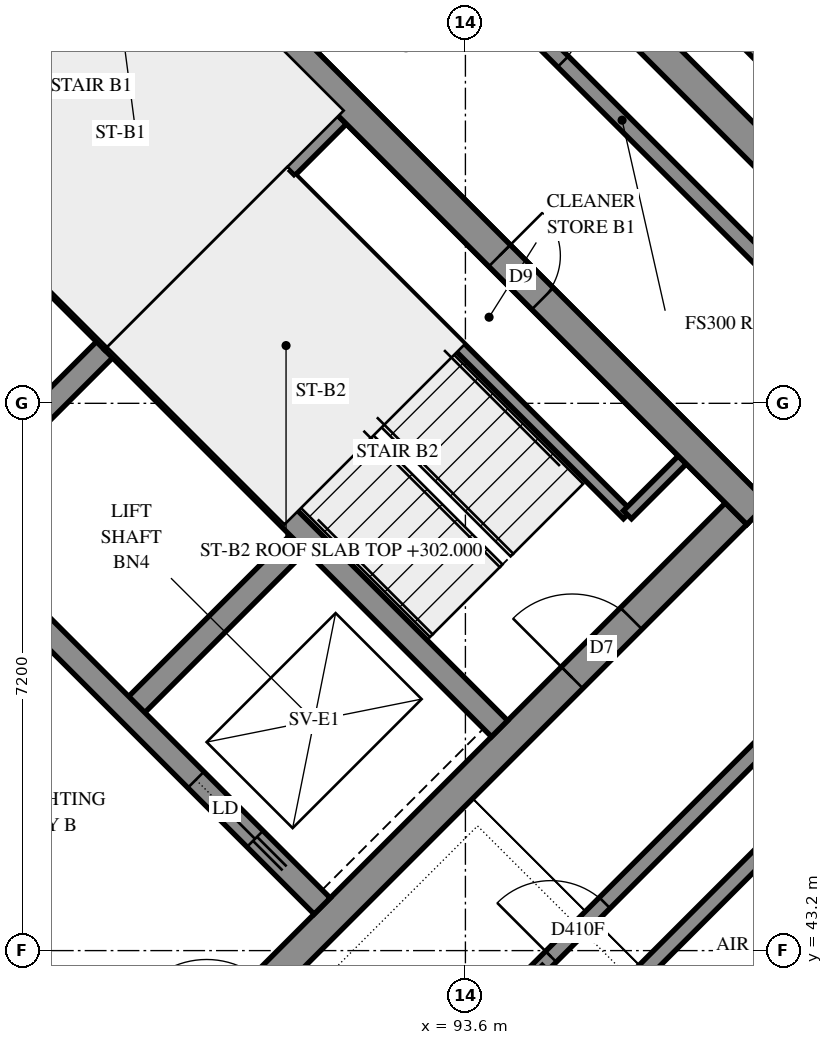
"""IFC4 building model, lengths in metres.
Left out: names, types, materials, properties, quantities, classifications, styles, units other than length and angle.
Written with IfcOpenShell. Run it as: python <this file> out.ifc"""

import sys

from ifc_helpers import new_model, si_unit, direction, frame, frame_2d, origin, place, context, subcontext, project, spatial, polyline, rectangle, outline, extrude, element, fill, save


model = new_model("IFC4")
c1 = context("Model", 3, precision=1e-05, world=origin(), true_north=direction((0.0, 1.0)))
c2 = subcontext(c1, "Body", "Model", "MODEL_VIEW")
j1 = project(units=[si_unit("LENGTHUNIT", "METRE"), si_unit("PLANEANGLEUNIT", "RADIAN")], contexts=[c1])
p1 = place(None, origin())
s1 = spatial("IfcSite", under=j1, at=p1, CompositionType="ELEMENT")
p2 = place(p1, origin())
s2 = spatial("IfcBuilding", under=s1, at=p2, CompositionType="ELEMENT")
p3 = place(p2, frame((0.0, 0.0, 302.0)))
s3 = spatial("IfcBuildingStorey", under=s2, at=p3, CompositionType="ELEMENT", Elevation=302.0)
p4 = place(p3, frame((86.695, 59.696, -0.3), z_axis=(0.0, 0.0, 1.0), x_axis=(0.7071100706, -0.7071034917, 0.0)))
e1 = element("IfcWall", 1, at=p4, inside=s3, PredefinedType="SHEAR", context=c2, shape_type="SweptSolid", body=[
    extrude(outline(polyline([(0.0, 0.0), (15.2, 0.0), (15.2, 3.1), (0.0, 3.1), (0.0, 0.0)])), frame((0.0, 0.2, 0.0), z_axis=(0.0, -1.0, 0.0), x_axis=(1.0, 0.0, 0.0)), (0.0, 0.0, 1.0), 0.4),
])
p5 = place(p4, frame((10.4, 0.0, 0.3)))
e2 = element("IfcOpeningElement", 2, at=p5, cuts=e1, PredefinedType="OPENING", context=c2, shape_type="SweptSolid", body=[
    extrude(rectangle(XDim=0.8, YDim=2.1, at=frame_2d((0.4, 1.05))), frame((0.0, 0.21, 0.0), z_axis=(0.0, -1.0, 0.0), x_axis=(1.0, 0.0, 0.0)), (0.0, 0.0, 1.0), 0.42),
])
p6 = place(p3, frame((89.17, 40.958, -0.3), z_axis=(0.0, 0.0, 1.0), x_axis=(0.7071067812, 0.7071067812, 0.0)))
e3 = element("IfcWall", 3, at=p6, inside=s3, PredefinedType="SHEAR", context=c2, shape_type="SweptSolid", body=[
    extrude(outline(polyline([(0.0, 0.0), (11.3, 0.0), (11.3, 3.1), (0.0, 3.1), (0.0, 0.0)])), frame((0.0, 0.2, 0.0), z_axis=(0.0, -1.0, 0.0), x_axis=(1.0, 0.0, 0.0)), (0.0, 0.0, 1.0), 0.4),
])
p7 = place(p6, frame((1.45, 0.0, 0.3)))
e4 = element("IfcOpeningElement", 4, at=p7, cuts=e3, PredefinedType="OPENING", context=c2, shape_type="SweptSolid", body=[
    extrude(rectangle(XDim=1.1, YDim=2.1, at=frame_2d((0.55, 1.05))), frame((0.0, 0.21, 0.0), z_axis=(0.0, -1.0, 0.0), x_axis=(1.0, 0.0, 0.0)), (0.0, 0.0, 1.0), 0.42),
])
p8 = place(p6, frame((8.25, 0.0, 0.3)))
e5 = element("IfcOpeningElement", 5, at=p8, cuts=e3, PredefinedType="OPENING", context=c2, shape_type="SweptSolid", body=[
    extrude(rectangle(XDim=1.1, YDim=2.1, at=frame_2d((0.55, 1.05))), frame((0.0, 0.21, 0.0), z_axis=(0.0, -1.0, 0.0), x_axis=(1.0, 0.0, 0.0)), (0.0, 0.0, 1.0), 0.42),
])
for number, where, z_axis, x_axis in (
    (6, (86.625, 48.878, 0.0), (0.0, 0.0, 1.0), (0.707, 0.707, 0.0)),
    (7, (89.17, 46.332, 0.0), (0.0, 0.0, 1.0), (0.707, 0.707, 0.0)),
):
    element("IfcWall", number, at=place(p3, frame(where, z_axis=z_axis, x_axis=x_axis)), inside=s3, PredefinedType="SOLIDWALL", context=c2, shape_type="SweptSolid", body=[
        extrude(outline(polyline([(0.0, 0.0), (3.3, 0.0), (3.3, 3.5), (0.0, 3.5), (0.0, 0.0)])), frame((0.0, 0.15, 0.0), z_axis=(0.0, -1.0, 0.0), x_axis=(1.0, 0.0, 0.0)), (0.0, 0.0, 1.0), 0.3),
    ])
p9 = place(p3, frame((78.988, 51.423, 0.0), z_axis=(0.0, 0.0, 1.0), x_axis=(0.7071067812, -0.7071067812, 0.0)))
e8 = element("IfcWall", 8, at=p9, inside=s3, PredefinedType="SOLIDWALL", context=c2, shape_type="SweptSolid", body=[
    extrude(outline(polyline([(0.0, 0.0), (14.4, 0.0), (14.4, 3.5), (0.0, 3.5), (0.0, 0.0)])), frame((0.0, 0.15, 0.0), z_axis=(0.0, -1.0, 0.0), x_axis=(1.0, 0.0, 0.0)), (0.0, 0.0, 1.0), 0.3),
])
p10 = place(p3, frame((81.534, 53.969, 0.0), z_axis=(0.0, 0.0, 1.0), x_axis=(0.707103309, -0.7071102534, 0.0)))
e9 = element("IfcWall", 9, at=p10, inside=s3, PredefinedType="SOLIDWALL", context=c2, shape_type="SweptSolid", body=[
    extrude(outline(polyline([(0.0, 0.0), (14.4, 0.0), (14.4, 3.5), (0.0, 3.5), (0.0, 0.0)])), frame((0.0, 0.15, 0.0), z_axis=(0.0, -1.0, 0.0), x_axis=(1.0, 0.0, 0.0)), (0.0, 0.0, 1.0), 0.3),
])
p11 = place(p10, frame((12.05, 0.0, 0.0)))
e10 = element("IfcOpeningElement", 10, at=p11, cuts=e9, PredefinedType="OPENING", context=c2, shape_type="SweptSolid", body=[
    extrude(rectangle(XDim=1.1, YDim=2.1, at=frame_2d((0.55, 1.05))), frame((0.0, 0.16, 0.0), z_axis=(0.0, -1.0, 0.0), x_axis=(1.0, 0.0, 0.0)), (0.0, 0.0, 1.0), 0.32),
])
for number, where, z_axis, x_axis in (
    (11, (83.867, 56.302, 0.0), (0.0, 0.0, 1.0), (0.707, -0.707, 0.0)),
    (12, (88.958, 51.211, 0.0), (0.0, 0.0, 1.0), (0.707, -0.707, 0.0)),
):
    element("IfcWall", number, at=place(p3, frame(where, z_axis=z_axis, x_axis=x_axis)), inside=s3, PredefinedType="SOLIDWALL", context=c2, shape_type="SweptSolid", body=[
        extrude(outline(polyline([(0.0, 0.0), (7.2, 0.0), (7.2, 3.5), (0.0, 3.5), (0.0, 0.0)])), frame((0.0, 0.15, 0.0), z_axis=(0.0, -1.0, 0.0), x_axis=(1.0, 0.0, 0.0)), (0.0, 0.0, 1.0), 0.3),
    ])
p12 = place(p3, frame((88.958, 51.211, 0.0), z_axis=(0.0, 0.0, 1.0), x_axis=(0.7071067812, 0.7071067812, 0.0)))
e13 = element("IfcWall", 13, at=p12, inside=s3, PredefinedType="SOLIDWALL", context=c2, shape_type="SweptSolid", body=[
    extrude(outline(polyline([(0.0, 0.0), (4.2, 0.0), (4.2, 3.5), (0.0, 3.5), (0.0, 0.0)])), frame((0.0, 0.15, 0.0), z_axis=(0.0, -1.0, 0.0), x_axis=(1.0, 0.0, 0.0)), (0.0, 0.0, 1.0), 0.3),
])
p13 = place(p3, frame((100.48, 52.134, 0.0), z_axis=(0.0, 0.0, 1.0), x_axis=(-0.7071067812, 0.7071067812, 0.0)))
e14 = element("IfcWall", 14, at=p13, inside=s3, PredefinedType="SOLIDWALL", context=c2, shape_type="SweptSolid", body=[
    extrude(outline(polyline([(0.036, -0.2), (6.718, -0.2), (6.718, 0.2), (-0.036, 0.2), (0.036, -0.2)])), origin(), (0.0, 0.0, 1.0), 3.5),
])
p14 = place(p13, frame((1.147, 0.0, 0.7)))
e15 = element("IfcOpeningElement", 15, at=p14, cuts=e14, PredefinedType="OPENING", context=c2, shape_type="SweptSolid", body=[
    extrude(rectangle(XDim=1.8, YDim=2.2, at=frame_2d((0.9, 1.1))), frame((0.0, 0.21, 0.0), z_axis=(0.0, -1.0, 0.0), x_axis=(1.0, 0.0, 0.0)), (0.0, 0.0, 1.0), 0.42),
])
p15 = place(p13, frame((4.306, 0.0, 0.7)))
e16 = element("IfcOpeningElement", 16, at=p15, cuts=e14, PredefinedType="OPENING", context=c2, shape_type="SweptSolid", body=[
    extrude(rectangle(XDim=1.8, YDim=2.2, at=frame_2d((0.9, 1.1))), frame((0.0, 0.21, 0.0), z_axis=(0.0, -1.0, 0.0), x_axis=(1.0, 0.0, 0.0)), (0.0, 0.0, 1.0), 0.42),
])
p16 = place(p3, frame((72.821, 56.6, 0.0), z_axis=(0.0, 0.0, 1.0), x_axis=(0.7071067812, -0.7071067812, 0.0)))
e17 = element("IfcWall", 17, at=p16, inside=s3, PredefinedType="SOLIDWALL", context=c2, shape_type="SweptSolid", body=[
    extrude(outline(polyline([(0.083, -0.2), (30.821, -0.2), (30.421, 0.2), (-0.083, 0.2), (0.083, -0.2)])), origin(), (0.0, 0.0, 1.0), 3.5),
])
p17 = place(p16, frame((2.421, 0.0, 0.7)))
e18 = element("IfcOpeningElement", 18, at=p17, cuts=e17, PredefinedType="OPENING", context=c2, shape_type="SweptSolid", body=[
    extrude(rectangle(XDim=1.8, YDim=2.2, at=frame_2d((0.9, 1.1))), frame((0.0, 0.21, 0.0), z_axis=(0.0, -1.0, 0.0), x_axis=(1.0, 0.0, 0.0)), (0.0, 0.0, 1.0), 0.42),
])
p18 = place(p16, frame((5.521, 0.0, 0.7)))
e19 = element("IfcOpeningElement", 19, at=p18, cuts=e17, PredefinedType="OPENING", context=c2, shape_type="SweptSolid", body=[
    extrude(rectangle(XDim=1.8, YDim=2.2, at=frame_2d((0.9, 1.1))), frame((0.0, 0.21, 0.0), z_axis=(0.0, -1.0, 0.0), x_axis=(1.0, 0.0, 0.0)), (0.0, 0.0, 1.0), 0.42),
])
p19 = place(p16, frame((8.921, 0.0, 0.7)))
e20 = element("IfcOpeningElement", 20, at=p19, cuts=e17, PredefinedType="OPENING", context=c2, shape_type="SweptSolid", body=[
    extrude(rectangle(XDim=1.8, YDim=2.2, at=frame_2d((0.9, 1.1))), frame((0.0, 0.21, 0.0), z_axis=(0.0, -1.0, 0.0), x_axis=(1.0, 0.0, 0.0)), (0.0, 0.0, 1.0), 0.42),
])
p20 = place(p16, frame((12.521, 0.0, 0.7)))
e21 = element("IfcOpeningElement", 21, at=p20, cuts=e17, PredefinedType="OPENING", context=c2, shape_type="SweptSolid", body=[
    extrude(rectangle(XDim=1.8, YDim=2.2, at=frame_2d((0.9, 1.1))), frame((0.0, 0.21, 0.0), z_axis=(0.0, -1.0, 0.0), x_axis=(1.0, 0.0, 0.0)), (0.0, 0.0, 1.0), 0.42),
])
p21 = place(p16, frame((16.121, 0.0, 0.7)))
e22 = element("IfcOpeningElement", 22, at=p21, cuts=e17, PredefinedType="OPENING", context=c2, shape_type="SweptSolid", body=[
    extrude(rectangle(XDim=1.8, YDim=2.2, at=frame_2d((0.9, 1.1))), frame((0.0, 0.21, 0.0), z_axis=(0.0, -1.0, 0.0), x_axis=(1.0, 0.0, 0.0)), (0.0, 0.0, 1.0), 0.42),
])
p22 = place(p16, frame((19.721, 0.0, 0.7)))
e23 = element("IfcOpeningElement", 23, at=p22, cuts=e17, PredefinedType="OPENING", context=c2, shape_type="SweptSolid", body=[
    extrude(rectangle(XDim=1.8, YDim=2.2, at=frame_2d((0.9, 1.1))), frame((0.0, 0.21, 0.0), z_axis=(0.0, -1.0, 0.0), x_axis=(1.0, 0.0, 0.0)), (0.0, 0.0, 1.0), 0.42),
])
p23 = place(p16, frame((23.071, 0.0, 0.7)))
e24 = element("IfcOpeningElement", 24, at=p23, cuts=e17, PredefinedType="OPENING", context=c2, shape_type="SweptSolid", body=[
    extrude(rectangle(XDim=1.8, YDim=2.2, at=frame_2d((0.9, 1.1))), frame((0.0, 0.21, 0.0), z_axis=(0.0, -1.0, 0.0), x_axis=(1.0, 0.0, 0.0)), (0.0, 0.0, 1.0), 0.42),
])
p24 = place(p16, frame((26.921, 0.0, 0.7)))
e25 = element("IfcOpeningElement", 25, at=p24, cuts=e17, PredefinedType="OPENING", context=c2, shape_type="SweptSolid", body=[
    extrude(rectangle(XDim=1.8, YDim=2.2, at=frame_2d((0.9, 1.1))), frame((0.0, 0.21, 0.0), z_axis=(0.0, -1.0, 0.0), x_axis=(1.0, 0.0, 0.0)), (0.0, 0.0, 1.0), 0.42),
])
p25 = place(p3, frame((94.474, 34.948, 0.0), z_axis=(0.0, 0.0, 1.0), x_axis=(0.7071110915, 0.7071024708, 0.0)))
e26 = element("IfcWall", 26, at=p25, inside=s3, PredefinedType="SOLIDWALL", context=c2, shape_type="SweptSolid", body=[
    extrude(outline(polyline([(-0.2, -0.2), (11.8, -0.2), (11.4, 0.2), (0.2, 0.2), (-0.2, -0.2)])), origin(), (0.0, 0.0, 1.0), 3.5),
])
p26 = place(p25, frame((1.6, 0.0, 0.7)))
e27 = element("IfcOpeningElement", 27, at=p26, cuts=e26, PredefinedType="OPENING", context=c2, shape_type="SweptSolid", body=[
    extrude(rectangle(XDim=1.8, YDim=2.2, at=frame_2d((0.9, 1.1))), frame((0.0, 0.21, 0.0), z_axis=(0.0, -1.0, 0.0), x_axis=(1.0, 0.0, 0.0)), (0.0, 0.0, 1.0), 0.42),
])
p27 = place(p25, frame((5.8, 0.0, 0.7)))
e28 = element("IfcOpeningElement", 28, at=p27, cuts=e26, PredefinedType="OPENING", context=c2, shape_type="SweptSolid", body=[
    extrude(rectangle(XDim=1.8, YDim=2.2, at=frame_2d((0.9, 1.1))), frame((0.0, 0.21, 0.0), z_axis=(0.0, -1.0, 0.0), x_axis=(1.0, 0.0, 0.0)), (0.0, 0.0, 1.0), 0.42),
])
p28 = place(p25, frame((8.8, 0.0, 0.7)))
e29 = element("IfcOpeningElement", 29, at=p28, cuts=e26, PredefinedType="OPENING", context=c2, shape_type="SweptSolid", body=[
    extrude(rectangle(XDim=1.8, YDim=2.2, at=frame_2d((0.9, 1.1))), frame((0.0, 0.21, 0.0), z_axis=(0.0, -1.0, 0.0), x_axis=(1.0, 0.0, 0.0)), (0.0, 0.0, 1.0), 0.42),
])
p29 = place(p3, frame((91.313, 53.354, 0.0), z_axis=(0.0, 0.0, 1.0), x_axis=(0.7071147811, -0.7070987812, 0.0)))
e30 = element("IfcWall", 30, at=p29, inside=s3, PredefinedType="PARTITIONING", context=c2, shape_type="SweptSolid", body=[
    extrude(outline(polyline([(0.0, 0.0), (6.25, 0.0), (6.25, 3.5), (0.0, 3.5), (0.0, 0.0)])), frame((0.0, 0.075, 0.0), z_axis=(0.0, -1.0, 0.0), x_axis=(1.0, 0.0, 0.0)), (0.0, 0.0, 1.0), 0.15),
])
p30 = place(p3, frame((95.732, 48.934, 0.0), z_axis=(0.0, 0.0, 1.0), x_axis=(0.7071067812, 0.7071067812, 0.0)))
e31 = element("IfcWall", 31, at=p30, inside=s3, PredefinedType="PARTITIONING", context=c2, shape_type="SweptSolid", body=[
    extrude(outline(polyline([(0.0, 0.0), (1.02, 0.0), (1.02, 3.5), (0.0, 3.5), (0.0, 0.0)])), frame((0.0, 0.075, 0.0), z_axis=(0.0, -1.0, 0.0), x_axis=(1.0, 0.0, 0.0)), (0.0, 0.0, 1.0), 0.15),
])
p31 = place(p3, frame((86.833, 62.947, 0.0), z_axis=(0.0, 0.0, 1.0), x_axis=(0.7071067812, -0.7071067812, 0.0)))
e32 = element("IfcWall", 32, at=p31, inside=s3, PredefinedType="PARTITIONING", context=c2, shape_type="SweptSolid", body=[
    extrude(rectangle(XDim=19.601, YDim=0.2, at=frame_2d((9.8, 0.0))), origin(), (0.0, 0.0, 1.0), 3.5),
])
p32 = place(p31, frame((10.386, 0.0, 0.0)))
e33 = element("IfcOpeningElement", 33, at=p32, cuts=e32, PredefinedType="OPENING", context=c2, shape_type="SweptSolid", body=[
    extrude(rectangle(XDim=1.0, YDim=2.1, at=frame_2d((0.5, 1.05))), frame((0.0, 0.11, 0.0), z_axis=(0.0, -1.0, 0.0), x_axis=(1.0, 0.0, 0.0)), (0.0, 0.0, 1.0), 0.22),
])
p33 = place(p3, frame((94.543, 42.939, 0.0), z_axis=(0.0, 0.0, 1.0), x_axis=(0.7071067812, 0.7071067812, 0.0)))
e34 = element("IfcWall", 34, at=p33, inside=s3, PredefinedType="PARTITIONING", context=c2, shape_type="SweptSolid", body=[
    extrude(rectangle(XDim=8.7, YDim=0.2, at=frame_2d((4.35, 0.0))), origin(), (0.0, 0.0, 1.0), 3.5),
])
p34 = place(p33, frame((0.258, 0.0, 0.0)))
e35 = element("IfcOpeningElement", 35, at=p34, cuts=e34, PredefinedType="OPENING", context=c2, shape_type="SweptSolid", body=[
    extrude(rectangle(XDim=1.0, YDim=2.1, at=frame_2d((0.5, 1.05))), frame((0.0, 0.11, 0.0), z_axis=(0.0, -1.0, 0.0), x_axis=(1.0, 0.0, 0.0)), (0.0, 0.0, 1.0), 0.22),
])
p35 = place(p3, frame((94.541, 42.935, 0.0), z_axis=(0.0, 0.0, 1.0), x_axis=(0.7071067812, -0.7071067812, 0.0)))
e36 = element("IfcWall", 36, at=p35, inside=s3, PredefinedType="PARTITIONING", context=c2, shape_type="SweptSolid", body=[
    extrude(rectangle(XDim=4.599, YDim=0.2, at=frame_2d((2.3, 0.0))), origin(), (0.0, 0.0, 1.0), 3.5),
])
p36 = place(p35, frame((1.525, 0.0, 0.0)))
e37 = element("IfcOpeningElement", 37, at=p36, cuts=e36, PredefinedType="OPENING", context=c2, shape_type="SweptSolid", body=[
    extrude(rectangle(XDim=1.0, YDim=2.1, at=frame_2d((0.5, 1.05))), frame((0.0, 0.11, 0.0), z_axis=(0.0, -1.0, 0.0), x_axis=(1.0, 0.0, 0.0)), (0.0, 0.0, 1.0), 0.22),
])
p37 = place(p3, frame((95.25, 42.232, 0.0), z_axis=(0.0, 0.0, 1.0), x_axis=(0.7071067812, 0.7071067812, 0.0)))
e38 = element("IfcWall", 38, at=p37, inside=s3, PredefinedType="PARTITIONING", context=c2, shape_type="SweptSolid", body=[
    extrude(outline(polyline([(0.0, -0.1), (5.7, -0.1), (5.7, 0.1), (0.0, 0.1), (0.0, -0.1)])), origin(), (0.0, 0.0, 1.0), 3.5),
])
p38 = place(p5, origin())
e39 = element("IfcDoor", 39, at=p38, inside=s3, OperationType="SINGLE_SWING_RIGHT", PredefinedType="DOOR", context=c2, shape_type="SweptSolid", body=[
    extrude(rectangle(XDim=0.8, YDim=2.1, at=frame_2d((0.4, 1.05))), frame((0.0, 0.025, 0.0), z_axis=(0.0, -1.0, 0.0), x_axis=(1.0, 0.0, 0.0)), (0.0, 0.0, 1.0), 0.05),
])
fill(e2, e39)
p39 = place(p8, origin())
e40 = element("IfcDoor", 40, at=p39, inside=s3, OperationType="SINGLE_SWING_RIGHT", PredefinedType="DOOR", context=c2, shape_type="SweptSolid", body=[
    extrude(rectangle(XDim=1.1, YDim=2.1, at=frame_2d((0.55, 1.05))), frame((0.0, 0.025, 0.0), z_axis=(0.0, -1.0, 0.0), x_axis=(1.0, 0.0, 0.0)), (0.0, 0.0, 1.0), 0.05),
])
fill(e5, e40)
p40 = place(p11, origin())
e41 = element("IfcDoor", 41, at=p40, inside=s3, OperationType="SLIDING_TO_RIGHT", PredefinedType="DOOR", context=c2, shape_type="SweptSolid", body=[
    extrude(rectangle(XDim=1.1, YDim=2.1, at=frame_2d((0.55, 1.05))), frame((0.0, 0.025, 0.0), z_axis=(0.0, -1.0, 0.0), x_axis=(1.0, 0.0, 0.0)), (0.0, 0.0, 1.0), 0.05),
])
fill(e10, e41)
p41 = place(p34, origin())
e42 = element("IfcDoor", 42, at=p41, inside=s3, OperationType="SINGLE_SWING_LEFT", PredefinedType="DOOR", context=c2, shape_type="SweptSolid", body=[
    extrude(rectangle(XDim=1.0, YDim=2.1, at=frame_2d((0.5, 1.05))), frame((0.0, 0.025, 0.0), z_axis=(0.0, -1.0, 0.0), x_axis=(1.0, 0.0, 0.0)), (0.0, 0.0, 1.0), 0.05),
])
fill(e35, e42)
p42 = place(p32, origin())
e43 = element("IfcDoor", 43, at=p42, inside=s3, OperationType="SINGLE_SWING_LEFT", PredefinedType="DOOR", context=c2, shape_type="SweptSolid", body=[
    extrude(rectangle(XDim=1.0, YDim=2.1, at=frame_2d((0.5, 1.05))), frame((0.0, 0.025, 0.0), z_axis=(0.0, -1.0, 0.0), x_axis=(1.0, 0.0, 0.0)), (0.0, 0.0, 1.0), 0.05),
])
fill(e33, e43)
save(model, sys.argv[1])
